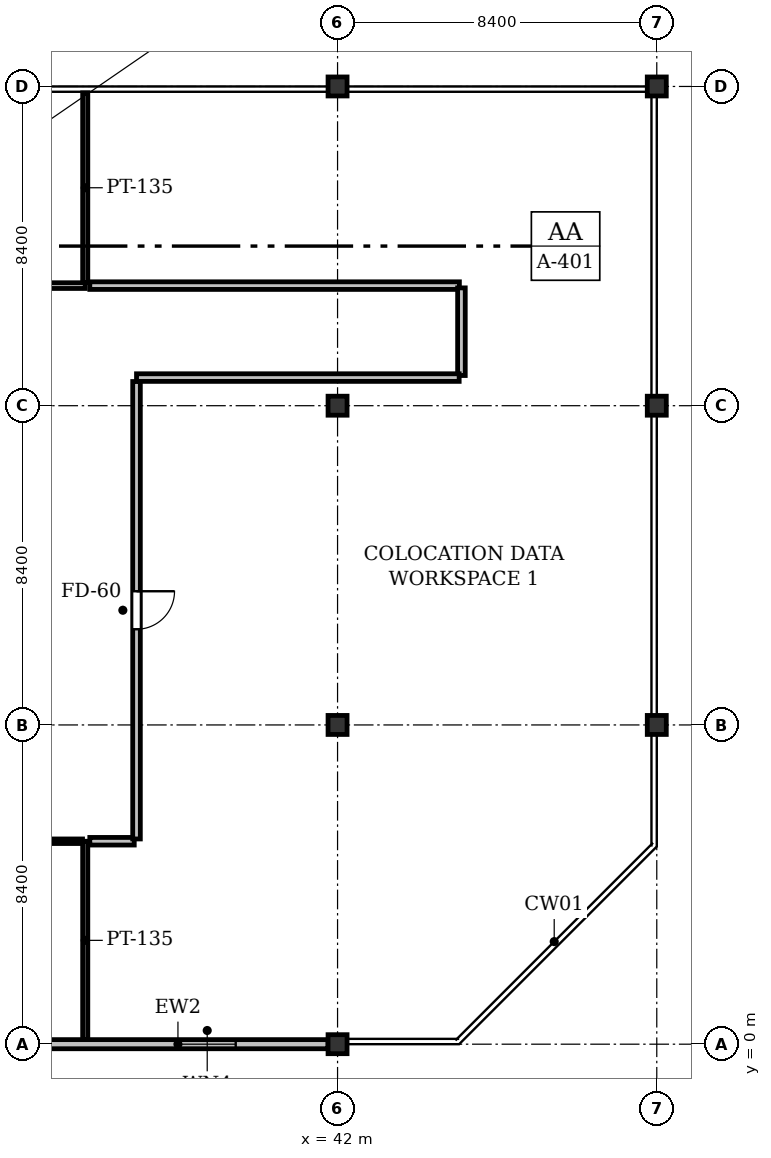
"""IFC4 building model, lengths in metres.
Left out: names, types, materials, properties, quantities, classifications, styles, units other than length and angle.
Written with IfcOpenShell. Run it as: python <this file> out.ifc"""

import sys

from ifc_helpers import new_model, si_unit, direction, frame, frame_2d, origin, origin_2d, place, context, subcontext, project, spatial, rectangle, i_section, extrude, element, fill, save


model = new_model("IFC4")
c1 = context("Model", 3, precision=1e-05, world=origin(), true_north=direction((0.0, 1.0)))
c2 = subcontext(c1, "Body", "Model", "MODEL_VIEW")
j1 = project(units=[si_unit("LENGTHUNIT", "METRE"), si_unit("PLANEANGLEUNIT", "RADIAN")], contexts=[c1])
p1 = place(None, origin())
s1 = spatial("IfcSite", under=j1, at=p1, CompositionType="ELEMENT")
p2 = place(p1, origin())
s2 = spatial("IfcBuilding", under=s1, at=p2, CompositionType="ELEMENT")
p3 = place(p2, frame((0.0, 0.0, 24.8)))
s3 = spatial("IfcBuildingStorey", under=s2, at=p3, CompositionType="ELEMENT", Elevation=24.8)
for number, where, z_axis, x_axis in (
    (1, (42.0, 0.0, 0.0), (0.0, 0.0, 1.0), (1.0, 0.0, 0.0)),
    (2, (42.0, 8.4, 0.0), (0.0, 0.0, 1.0), (1.0, 0.0, 0.0)),
    (3, (42.0, 16.8, 0.0), (0.0, 0.0, 1.0), (1.0, 0.0, 0.0)),
    (4, (42.0, 25.2, 0.0), (0.0, 0.0, 1.0), (1.0, 0.0, 0.0)),
    (5, (50.4, 8.4, 0.0), (0.0, 0.0, 1.0), (1.0, 0.0, 0.0)),
    (6, (50.4, 16.8, 0.0), (0.0, 0.0, 1.0), (1.0, 0.0, 0.0)),
    (7, (50.4, 25.2, 0.0), (0.0, 0.0, 1.0), (1.0, 0.0, 0.0)),
):
    element("IfcColumn", number, at=place(p3, frame(where, z_axis=z_axis, x_axis=x_axis)), inside=s3, PredefinedType="COLUMN", context=c2, shape_type="SweptSolid", body=[
        extrude(i_section(OverallWidth=0.5, OverallDepth=0.5, WebThickness=0.028, FlangeThickness=0.04, at=origin_2d()), origin(), (0.0, 0.0, 1.0), 4.2),
    ])
p4 = place(p3, frame((41.75, 0.0, 0.0), z_axis=(0.0, 0.0, 1.0), x_axis=(-1.0, 0.0, 0.0)))
e8 = element("IfcWall", 8, at=p4, inside=s3, PredefinedType="STANDARD", context=c2, shape_type="SweptSolid", body=[
    extrude(rectangle(XDim=7.9, YDim=0.24, at=frame_2d((3.95, 0.0))), origin(), (0.0, 0.0, 1.0), 3.471),
])
p5 = place(p4, frame((2.43, 0.0, 0.9)))
e9 = element("IfcOpeningElement", 9, at=p5, cuts=e8, PredefinedType="OPENING", context=c2, shape_type="SweptSolid", body=[
    extrude(rectangle(XDim=1.5, YDim=1.6, at=frame_2d((0.75, 0.8))), frame((0.0, 0.13, 0.0), z_axis=(0.0, -1.0, 0.0), x_axis=(1.0, 0.0, 0.0)), (0.0, 0.0, 1.0), 0.26),
])
p6 = place(p3, frame((19.96, 19.96, 0.0), z_axis=(0.0, 0.0, 1.0), x_axis=(0.999999999874, -1.5852885e-05, 0.0)))
e10 = element("IfcWall", 10, at=p6, inside=s3, PredefinedType="PARTITIONING", context=c2, shape_type="SweptSolid", body=[
    extrude(rectangle(XDim=15.4, YDim=0.15, at=frame_2d((7.7, 0.0))), origin(), (0.0, 0.0, 1.0), 3.323),
])
p7 = place(p6, frame((7.225, 0.0, 0.0)))
e11 = element("IfcOpeningElement", 11, at=p7, cuts=e10, PredefinedType="OPENING", context=c2, shape_type="SweptSolid", body=[
    extrude(rectangle(XDim=0.95, YDim=2.15, at=frame_2d((0.475, 1.075))), frame((0.0, 0.085, 0.0), z_axis=(0.0, -1.0, 0.0), x_axis=(1.0, 0.0, 0.0)), (0.0, 0.0, 1.0), 0.17),
])
p8 = place(p3, frame((35.36, 20.039, 0.0), z_axis=(0.0, 0.0, 1.0), x_axis=(0.0, 1.0, 0.0)))
e12 = element("IfcWall", 12, at=p8, inside=s3, PredefinedType="PARTITIONING", context=c2, shape_type="SweptSolid", body=[
    extrude(rectangle(XDim=4.992, YDim=0.135, at=frame_2d((2.496, 0.0))), origin(), (0.0, 0.0, 1.0), 3.925),
])
p9 = place(p3, frame((35.36, 0.124, 0.0), z_axis=(0.0, 0.0, 1.0), x_axis=(0.0, 1.0, 0.0)))
e13 = element("IfcWall", 13, at=p9, inside=s3, PredefinedType="PARTITIONING", context=c2, shape_type="SweptSolid", body=[
    extrude(rectangle(XDim=5.216, YDim=0.135, at=frame_2d((2.608, 0.0))), origin(), (0.0, 0.0, 1.0), 3.925),
])
p10 = place(p3, frame((35.289, 5.34, 0.0), z_axis=(0.0, 0.0, 1.0), x_axis=(-1.0, 0.0, 0.0)))
e14 = element("IfcWall", 14, at=p10, inside=s3, PredefinedType="PARTITIONING", context=c2, shape_type="SweptSolid", body=[
    extrude(rectangle(XDim=0.889, YDim=0.12, at=frame_2d((0.444, 0.0))), origin(), (0.0, 0.0, 1.0), 3.925),
])
p11 = place(p3, frame((36.65, 5.34, 0.0), z_axis=(0.0, 0.0, 1.0), x_axis=(-1.0, 0.0, 0.0)))
e15 = element("IfcWall", 15, at=p11, inside=s3, PredefinedType="PARTITIONING", context=c2, shape_type="SweptSolid", body=[
    extrude(rectangle(XDim=1.169, YDim=0.2, at=frame_2d((0.585, 0.0))), origin(), (0.0, 0.0, 1.0), 3.925),
])
p12 = place(p3, frame((35.48, 19.96, 0.0), z_axis=(0.0, 0.0, 1.0), x_axis=(1.0, 0.0, 0.0)))
e16 = element("IfcWall", 16, at=p12, inside=s3, PredefinedType="PARTITIONING", context=c2, shape_type="SweptSolid", body=[
    extrude(rectangle(XDim=9.725, YDim=0.2, at=frame_2d((4.863, 0.0))), origin(), (0.0, 0.0, 1.0), 3.323),
])
p13 = place(p3, frame((45.26, 19.9, 0.0), z_axis=(0.0, 0.0, 1.0), x_axis=(-0.000105876124, -0.999999994395, 0.0)))
e17 = element("IfcWall", 17, at=p13, inside=s3, PredefinedType="PARTITIONING", context=c2, shape_type="SweptSolid", body=[
    extrude(rectangle(XDim=2.306, YDim=0.2, at=frame_2d((1.153, 0.0))), origin(), (0.0, 0.0, 1.0), 3.925),
])
p14 = place(p3, frame((45.2, 17.54, 0.0), z_axis=(0.0, 0.0, 1.0), x_axis=(-1.0, 0.0, 0.0)))
e18 = element("IfcWall", 18, at=p14, inside=s3, PredefinedType="PARTITIONING", context=c2, shape_type="SweptSolid", body=[
    extrude(rectangle(XDim=8.49, YDim=0.2, at=frame_2d((4.245, 0.0))), origin(), (0.0, 0.0, 1.0), 3.323),
])
p15 = place(p3, frame((36.71, 17.436, 0.0), z_axis=(0.0, 0.0, 1.0), x_axis=(0.0, -1.0, 0.0)))
e19 = element("IfcWall", 19, at=p15, inside=s3, PredefinedType="PARTITIONING", context=c2, shape_type="SweptSolid", body=[
    extrude(rectangle(XDim=12.036, YDim=0.2, at=frame_2d((6.018, 0.0))), origin(), (0.0, 0.0, 1.0), 3.313),
])
p16 = place(p15, frame((5.518, 0.0, 0.0)))
e20 = element("IfcOpeningElement", 20, at=p16, cuts=e19, PredefinedType="OPENING", context=c2, shape_type="SweptSolid", body=[
    extrude(rectangle(XDim=1.0, YDim=2.15, at=frame_2d((0.5, 1.075))), frame((0.0, 0.11, 0.0), z_axis=(0.0, -1.0, 0.0), x_axis=(1.0, 0.0, 0.0)), (0.0, 0.0, 1.0), 0.22),
])
p17 = place(p5, origin())
e21 = element("IfcWindow", 21, at=p17, inside=s3, PartitioningType="SINGLE_PANEL", PredefinedType="WINDOW", context=c2, shape_type="SweptSolid", body=[
    extrude(rectangle(XDim=1.5, YDim=1.6, at=frame_2d((0.75, 0.8))), frame((0.0, 0.03, 0.0), z_axis=(0.0, -1.0, 0.0), x_axis=(1.0, 0.0, 0.0)), (0.0, 0.0, 1.0), 0.06),
])
fill(e9, e21)
p18 = place(p16, origin())
e22 = element("IfcDoor", 22, at=p18, inside=s3, OperationType="SINGLE_SWING_LEFT", PredefinedType="DOOR", context=c2, shape_type="SweptSolid", body=[
    extrude(rectangle(XDim=1.0, YDim=2.15, at=frame_2d((0.5, 1.075))), frame((0.0, 0.025, 0.0), z_axis=(0.0, -1.0, 0.0), x_axis=(1.0, 0.0, 0.0)), (0.0, 0.0, 1.0), 0.05),
])
fill(e20, e22)
save(model, sys.argv[1])
